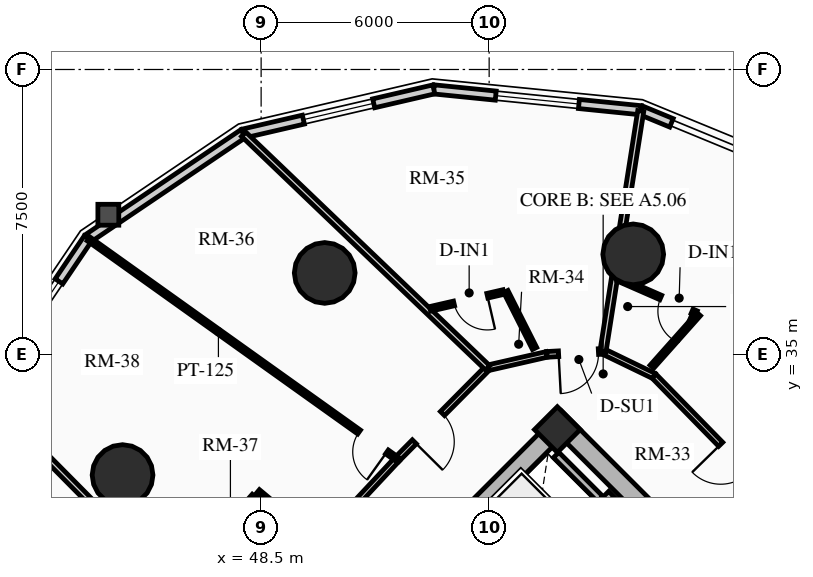
"""IFC4 building model, lengths in metres.
Left out: names, types, materials, properties, quantities, classifications, styles, units other than length and angle.
Written with IfcOpenShell. Run it as: python <this file> out.ifc"""

import sys

from ifc_helpers import new_model, si_unit, direction, frame, frame_2d, origin, origin_2d, place, context, subcontext, project, spatial, rectangle, circle, extrude, source, transform, mapped, element, fill, save


model = new_model("IFC4")
c1 = context("Model", 3, precision=1e-05, world=origin(), true_north=direction((0.0, 1.0)))
c2 = subcontext(c1, "Body", "Model", "MODEL_VIEW")
j1 = project(units=[si_unit("LENGTHUNIT", "METRE"), si_unit("PLANEANGLEUNIT", "RADIAN")], contexts=[c1])
p1 = place(None, origin())
s1 = spatial("IfcSite", under=j1, at=p1, CompositionType="ELEMENT")
p2 = place(p1, origin())
s2 = spatial("IfcBuilding", under=s1, at=p2, CompositionType="ELEMENT")
p3 = place(p2, frame((0.0, 0.0, 54.01)))
s3 = spatial("IfcBuildingStorey", under=s2, at=p3, CompositionType="ELEMENT", Elevation=54.01)
p4 = place(p3, frame((66.339, 23.227, 0.0), z_axis=(0.0, 0.0, 1.0), x_axis=(-0.707106781187, 0.707106781187, 0.0)))
e1 = element("IfcWall", 1, at=p4, inside=s3, PredefinedType="SHEAR", context=c2, shape_type="SweptSolid", body=[
    extrude(rectangle(XDim=14.3, YDim=0.5, at=frame_2d((7.15, 0.0))), origin(), (0.0, 0.0, 1.0), 2.91),
])
p5 = place(p3, frame((48.838, 25.596, 0.0), z_axis=(0.0, 0.0, 1.0), x_axis=(0.707106781187, 0.707106781187, 0.0)))
e2 = element("IfcWall", 2, at=p5, inside=s3, PredefinedType="SHEAR", context=c2, shape_type="SweptSolid", body=[
    extrude(rectangle(XDim=10.7, YDim=0.5, at=frame_2d((5.35, 0.0))), origin(), (0.0, 0.0, 1.0), 2.91),
])
m1 = source(origin(), c2, "Body", "SweptSolid", [
    extrude(rectangle(XDim=1.5, YDim=2.02, at=frame_2d((0.75, 1.01))), frame((0.0, 0.26, 0.0), z_axis=(0.0, -1.0, 0.0), x_axis=(1.0, 0.0, 0.0)), (0.0, 0.0, 1.0), 0.52),
])
p6 = place(p5, frame((4.6, 0.0, 0.0)))
e3 = element("IfcOpeningElement", 3, at=p6, cuts=e2, PredefinedType="OPENING", context=c2, shape_type="MappedRepresentation", body=[
    mapped(m1, transform((0.0, 0.0, 0.0), x_axis=(1.0, 0.0, 0.0), y_axis=(0.0, 1.0, 0.0), z_axis=(0.0, 0.0, 1.0), scale=1.0)),
])
p7 = place(p3, frame((56.294, 33.024, 0.0), z_axis=(0.0, 0.0, 1.0), x_axis=(0.707106781187, 0.707106781187, 0.0)))
e4 = element("IfcColumn", 4, at=p7, inside=s3, PredefinedType="COLUMN", context=c2, shape_type="SweptSolid", body=[
    extrude(rectangle(XDim=0.85, YDim=0.85, at=origin_2d()), origin(), (0.0, 0.0, 1.0), 2.91),
])
for number, where, z_axis, x_axis in (
    (5, (58.291, 37.635, 0.0), (0.0, 0.0, 1.0), (1.0, 0.0, 0.0)),
    (6, (50.173, 37.146, 0.0), (0.0, 0.0, 1.0), (1.0, 0.0, 0.0)),
    (7, (44.854, 31.827, 0.0), (0.0, 0.0, 1.0), (1.0, 0.0, 0.0)),
):
    element("IfcColumn", number, at=place(p3, frame(where, z_axis=z_axis, x_axis=x_axis)), inside=s3, PredefinedType="USERDEFINED", context=c2, shape_type="SweptSolid", body=[
        extrude(circle(Radius=0.8, at=origin_2d()), origin(), (0.0, 0.0, 1.0), 2.91),
    ])
p8 = place(p3, frame((58.493, 41.428, 0.0), z_axis=(0.0, 0.0, 1.0), x_axis=(0.924556017656, -0.381046152345, 0.0)))
e8 = element("IfcWall", 8, at=p8, inside=s3, PredefinedType="SOLIDWALL", context=c2, shape_type="SweptSolid", body=[
    extrude(rectangle(XDim=0.87, YDim=0.24, at=frame_2d((0.435, 0.0))), origin(), (0.0, 0.0, 1.0), 2.073),
])
p9 = place(p3, frame((53.043, 41.976, 0.0), z_axis=(0.0, 0.0, 1.0), x_axis=(0.994970765694, -0.100165739718, 0.0)))
e9 = element("IfcWall", 9, at=p9, inside=s3, PredefinedType="SOLIDWALL", context=c2, shape_type="SweptSolid", body=[
    extrude(rectangle(XDim=5.477, YDim=0.24, at=frame_2d((2.738, 0.0))), origin(), (0.0, 0.0, 1.0), 2.073),
])
m2 = source(origin(), c2, "Body", "SweptSolid", [
    extrude(rectangle(XDim=2.2, YDim=1.35, at=frame_2d((1.1, 0.675))), frame((0.0, 0.13, 0.0), z_axis=(0.0, -1.0, 0.0), x_axis=(1.0, 0.0, 0.0)), (0.0, 0.0, 1.0), 0.26),
])
p10 = place(p9, frame((1.638, 0.0, 0.65)))
e10 = element("IfcOpeningElement", 10, at=p10, cuts=e9, PredefinedType="OPENING", context=c2, shape_type="MappedRepresentation", body=[
    mapped(m2, transform((0.0, 0.0, 0.0), x_axis=(1.0, 0.0, 0.0), y_axis=(0.0, 1.0, 0.0), z_axis=(0.0, 0.0, 1.0), scale=1.0)),
])
p11 = place(p3, frame((48.031, 40.814, 0.0), z_axis=(0.0, 0.0, 1.0), x_axis=(0.974166016949, 0.225833060959, 0.0)))
e11 = element("IfcWall", 11, at=p11, inside=s3, PredefinedType="SOLIDWALL", context=c2, shape_type="SweptSolid", body=[
    extrude(rectangle(XDim=5.146, YDim=0.24, at=frame_2d((2.573, 0.0))), origin(), (0.0, 0.0, 1.0), 2.073),
])
m3 = source(origin(), c2, "Body", "SweptSolid", [
    extrude(rectangle(XDim=1.9, YDim=1.35, at=frame_2d((0.95, 0.675))), frame((0.0, 0.13, 0.0), z_axis=(0.0, -1.0, 0.0), x_axis=(1.0, 0.0, 0.0)), (0.0, 0.0, 1.0), 0.26),
])
p12 = place(p11, frame((1.623, 0.0, 0.65)))
e12 = element("IfcOpeningElement", 12, at=p12, cuts=e11, PredefinedType="OPENING", context=c2, shape_type="MappedRepresentation", body=[
    mapped(m3, transform((0.0, 0.0, 0.0), x_axis=(1.0, 0.0, 0.0), y_axis=(0.0, 1.0, 0.0), z_axis=(0.0, 0.0, 1.0), scale=1.0)),
])
p13 = place(p3, frame((43.945, 38.055, 0.0), z_axis=(0.0, 0.0, 1.0), x_axis=(0.828736708604, 0.559638693991, 0.0)))
e13 = element("IfcWall", 13, at=p13, inside=s3, PredefinedType="SOLIDWALL", context=c2, shape_type="SweptSolid", body=[
    extrude(rectangle(XDim=4.93, YDim=0.24, at=frame_2d((2.465, 0.0))), origin(), (0.0, 0.0, 1.0), 2.073),
])
p14 = place(p3, frame((41.186, 33.969, 0.0), z_axis=(0.0, 0.0, 1.0), x_axis=(0.559638693991, 0.828736708604, 0.0)))
e14 = element("IfcWall", 14, at=p14, inside=s3, PredefinedType="SOLIDWALL", context=c2, shape_type="SweptSolid", body=[
    extrude(rectangle(XDim=4.93, YDim=0.24, at=frame_2d((2.465, 0.0))), origin(), (0.0, 0.0, 1.0), 2.073),
])
p15 = place(p14, frame((1.365, 0.0, 0.65)))
e15 = element("IfcOpeningElement", 15, at=p15, cuts=e14, PredefinedType="OPENING", context=c2, shape_type="MappedRepresentation", body=[
    mapped(m2, transform((0.0, 0.0, 0.0), x_axis=(1.0, 0.0, 0.0), y_axis=(0.0, 1.0, 0.0), z_axis=(0.0, 0.0, 1.0), scale=1.0)),
])
p16 = place(p3, frame((55.615, 29.227, 0.0), z_axis=(0.0, 0.0, 1.0), x_axis=(0.707147878904, 0.70706568108, 0.0)))
e16 = element("IfcWall", 16, at=p16, inside=s3, PredefinedType="SHEAR", context=c2, shape_type="SweptSolid", body=[
    extrude(rectangle(XDim=2.97, YDim=0.2, at=frame_2d((1.485, 0.0))), origin(), (0.0, 0.0, 1.0), 2.91),
])
p17 = place(p3, frame((57.419, 31.2, 0.0), z_axis=(0.0, 0.0, 1.0), x_axis=(-0.707032117043, 0.707181437447, 0.0)))
e17 = element("IfcWall", 17, at=p17, inside=s3, PredefinedType="SHEAR", context=c2, shape_type="SweptSolid", body=[
    extrude(rectangle(XDim=1.635, YDim=0.2, at=frame_2d((0.817, 0.0))), origin(), (0.0, 0.0, 1.0), 2.91),
])
p18 = place(p3, frame((63.086, 30.086, 0.0), z_axis=(0.0, 0.0, 1.0), x_axis=(-0.699032802832, 0.715089603172, 0.0)))
e18 = element("IfcWall", 18, at=p18, inside=s3, PredefinedType="PARTITIONING", context=c2, shape_type="SweptSolid", body=[
    extrude(rectangle(XDim=6.082, YDim=0.15, at=frame_2d((3.041, 0.0))), origin(), (0.0, 0.0, 1.0), 2.159),
])
m4 = source(origin(), c2, "Body", "SweptSolid", [
    extrude(rectangle(XDim=1.05, YDim=2.015, at=frame_2d((0.525, 1.007))), frame((0.0, 0.085, 0.0), z_axis=(0.0, -1.0, 0.0), x_axis=(1.0, 0.0, 0.0)), (0.0, 0.0, 1.0), 0.17),
])
p19 = place(p18, frame((2.516, 0.0, 0.0)))
e19 = element("IfcOpeningElement", 19, at=p19, cuts=e18, PredefinedType="OPENING", context=c2, shape_type="MappedRepresentation", body=[
    mapped(m4, transform((0.0, 0.0, 0.0), x_axis=(1.0, 0.0, 0.0), y_axis=(0.0, 1.0, 0.0), z_axis=(0.0, 0.0, 1.0), scale=1.0)),
])
p20 = place(p3, frame((58.835, 34.435, 0.0), z_axis=(0.0, 0.0, 1.0), x_axis=(-0.900352167336, 0.4351620098, 0.0)))
e20 = element("IfcWall", 20, at=p20, inside=s3, PredefinedType="PARTITIONING", context=c2, shape_type="SweptSolid", body=[
    extrude(rectangle(XDim=1.488, YDim=0.15, at=frame_2d((0.744, 0.0))), origin(), (0.0, 0.0, 1.0), 2.205),
])
p21 = place(p3, frame((57.495, 35.083, 0.0), z_axis=(0.0, 0.0, 1.0), x_axis=(-0.998536503254, -0.054081897798, 0.0)))
e21 = element("IfcWall", 21, at=p21, inside=s3, PredefinedType="PARTITIONING", context=c2, shape_type="SweptSolid", body=[
    extrude(rectangle(XDim=1.481, YDim=0.15, at=frame_2d((0.74, 0.0))), origin(), (0.0, 0.0, 1.0), 2.159),
])
p22 = place(p21, frame((0.12, 0.0, 0.0)))
e22 = element("IfcOpeningElement", 22, at=p22, cuts=e21, PredefinedType="OPENING", context=c2, shape_type="MappedRepresentation", body=[
    mapped(m4, transform((0.0, 0.0, 0.0), x_axis=(1.0, 0.0, 0.0), y_axis=(0.0, 1.0, 0.0), z_axis=(0.0, 0.0, 1.0), scale=1.0)),
])
p23 = place(p3, frame((56.017, 35.003, 0.0), z_axis=(0.0, 0.0, 1.0), x_axis=(-0.974924954781, -0.222533890777, 0.0)))
e23 = element("IfcWall", 23, at=p23, inside=s3, PredefinedType="PARTITIONING", context=c2, shape_type="SweptSolid", body=[
    extrude(rectangle(XDim=1.595, YDim=0.15, at=frame_2d((0.798, 0.0))), origin(), (0.0, 0.0, 1.0), 2.205),
])
p24 = place(p3, frame((54.461, 34.648, 0.0), z_axis=(0.0, 0.0, 1.0), x_axis=(-0.70403409755, -0.710166170334, 0.0)))
e24 = element("IfcWall", 24, at=p24, inside=s3, PredefinedType="PARTITIONING", context=c2, shape_type="SweptSolid", body=[
    extrude(rectangle(XDim=3.384, YDim=0.15, at=frame_2d((1.692, 0.0))), origin(), (0.0, 0.0, 1.0), 2.159),
])
p25 = place(p24, frame((1.691, 0.0, 0.0)))
e25 = element("IfcOpeningElement", 25, at=p25, cuts=e24, PredefinedType="OPENING", context=c2, shape_type="MappedRepresentation", body=[
    mapped(m4, transform((0.0, 0.0, 0.0), x_axis=(1.0, 0.0, 0.0), y_axis=(0.0, 1.0, 0.0), z_axis=(0.0, 0.0, 1.0), scale=1.0)),
])
p26 = place(p3, frame((52.079, 32.244, 0.0), z_axis=(0.0, 0.0, 1.0), x_axis=(-0.682703325574, -0.730695674854, 0.0)))
e26 = element("IfcWall", 26, at=p26, inside=s3, PredefinedType="PARTITIONING", context=c2, shape_type="SweptSolid", body=[
    extrude(rectangle(XDim=6.527, YDim=0.15, at=frame_2d((3.263, 0.0))), origin(), (0.0, 0.0, 1.0), 2.159),
])
p27 = place(p3, frame((57.495, 35.083, 0.0), z_axis=(0.0, 0.0, 1.0), x_axis=(0.155296837382, 0.987867851638, 0.0)))
e27 = element("IfcWall", 27, at=p27, inside=s3, PredefinedType="PARTITIONING", context=c2, shape_type="SweptSolid", body=[
    extrude(rectangle(XDim=6.403, YDim=0.16, at=frame_2d((3.202, 0.0))), origin(), (0.0, 0.0, 1.0), 2.073),
])
p28 = place(p3, frame((54.461, 34.648, 0.0), z_axis=(0.0, 0.0, 1.0), x_axis=(-0.722290498621, 0.691589788532, 0.0)))
e28 = element("IfcWall", 28, at=p28, inside=s3, PredefinedType="PARTITIONING", context=c2, shape_type="SweptSolid", body=[
    extrude(rectangle(XDim=8.891, YDim=0.16, at=frame_2d((4.445, 0.0))), origin(), (0.0, 0.0, 1.0), 2.073),
])
p29 = place(p3, frame((47.623, 27.475, 0.0), z_axis=(0.0, 0.0, 1.0), x_axis=(-0.703512438021, 0.71068294587, 0.0)))
e29 = element("IfcWall", 29, at=p29, inside=s3, PredefinedType="PARTITIONING", context=c2, shape_type="SweptSolid", body=[
    extrude(rectangle(XDim=9.125, YDim=0.16, at=frame_2d((4.562, 0.0))), origin(), (0.0, 0.0, 1.0), 2.073),
])
p30 = place(p3, frame((55.695, 35.158, 0.0), z_axis=(0.0, 0.0, 1.0), x_axis=(-0.450698346964, 0.892676313142, 0.0)))
e30 = element("IfcWall", 30, at=p30, inside=s3, PredefinedType="PARTITIONING", context=c2, shape_type="SweptSolid", body=[
    extrude(rectangle(XDim=1.68, YDim=0.125, at=frame_2d((0.84, 0.0))), origin(), (0.0, 0.0, 1.0), 2.205),
])
p31 = place(p3, frame((54.878, 36.644, 0.0), z_axis=(0.0, 0.0, 1.0), x_axis=(-0.974554917581, -0.224148862631, 0.0)))
e31 = element("IfcWall", 31, at=p31, inside=s3, PredefinedType="PARTITIONING", context=c2, shape_type="SweptSolid", body=[
    extrude(rectangle(XDim=1.982, YDim=0.125, at=frame_2d((0.991, 0.0))), origin(), (0.0, 0.0, 1.0), 2.635),
])
m5 = source(origin(), c2, "Body", "SweptSolid", [
    extrude(rectangle(XDim=0.9, YDim=2.005, at=frame_2d((0.45, 1.002))), frame((0.0, 0.073, 0.0), z_axis=(0.0, -1.0, 0.0), x_axis=(1.0, 0.0, 0.0)), (0.0, 0.0, 1.0), 0.145),
])
p32 = place(p31, frame((0.436, 0.0, 0.0)))
e32 = element("IfcOpeningElement", 32, at=p32, cuts=e31, PredefinedType="OPENING", context=c2, shape_type="MappedRepresentation", body=[
    mapped(m5, transform((0.0, 0.0, 0.0), x_axis=(1.0, 0.0, 0.0), y_axis=(0.0, 1.0, 0.0), z_axis=(0.0, 0.0, 1.0), scale=1.0)),
])
p33 = place(p3, frame((52.079, 32.244, 0.0), z_axis=(0.0, 0.0, 1.0), x_axis=(-0.813888867537, 0.581020577346, 0.0)))
e33 = element("IfcWall", 33, at=p33, inside=s3, PredefinedType="PARTITIONING", context=c2, shape_type="SweptSolid", body=[
    extrude(rectangle(XDim=9.977, YDim=0.125, at=frame_2d((4.988, 0.0))), origin(), (0.0, 0.0, 1.0), 2.073),
])
p34 = place(p33, frame((0.33, 0.0, 0.0)))
e34 = element("IfcOpeningElement", 34, at=p34, cuts=e33, PredefinedType="OPENING", context=c2, shape_type="MappedRepresentation", body=[
    mapped(m5, transform((0.0, 0.0, 0.0), x_axis=(1.0, 0.0, 0.0), y_axis=(0.0, 1.0, 0.0), z_axis=(0.0, 0.0, 1.0), scale=1.0)),
])
p35 = place(p3, frame((49.809, 30.234, 0.0), z_axis=(0.0, 0.0, 1.0), x_axis=(-0.76830950514, 0.640078514177, 0.0)))
e35 = element("IfcWall", 35, at=p35, inside=s3, PredefinedType="PARTITIONING", context=c2, shape_type="SweptSolid", body=[
    extrude(rectangle(XDim=1.814, YDim=0.125, at=frame_2d((0.907, 0.0))), origin(), (0.0, 0.0, 1.0), 2.635),
])
p36 = place(p3, frame((48.313, 31.28, 0.0), z_axis=(0.0, 0.0, 1.0), x_axis=(-0.662230126621, -0.749300513409, 0.0)))
e36 = element("IfcWall", 36, at=p36, inside=s3, PredefinedType="PARTITIONING", context=c2, shape_type="SweptSolid", body=[
    extrude(rectangle(XDim=2.958, YDim=0.125, at=frame_2d((1.479, 0.0))), origin(), (0.0, 0.0, 1.0), 2.159),
])
p37 = place(p36, frame((0.12, 0.0, 0.0)))
e37 = element("IfcOpeningElement", 37, at=p37, cuts=e36, PredefinedType="OPENING", context=c2, shape_type="MappedRepresentation", body=[
    mapped(m5, transform((0.0, 0.0, 0.0), x_axis=(1.0, 0.0, 0.0), y_axis=(0.0, 1.0, 0.0), z_axis=(0.0, 0.0, 1.0), scale=1.0)),
])
p38 = place(p3, frame((58.78, 34.676, 0.0), z_axis=(0.0, 0.0, 1.0), x_axis=(0.6649433297, 0.746893813261, 0.0)))
e38 = element("IfcWall", 38, at=p38, inside=s3, PredefinedType="PARTITIONING", context=c2, shape_type="SweptSolid", body=[
    extrude(rectangle(XDim=1.856, YDim=0.125, at=frame_2d((0.928, 0.0))), origin(), (0.0, 0.0, 1.0), 2.205),
])
p39 = place(p3, frame((59.95, 36.09, 0.0), z_axis=(0.0, 0.0, 1.0), x_axis=(-0.916037613906, 0.401092370795, 0.0)))
e39 = element("IfcWall", 39, at=p39, inside=s3, PredefinedType="PARTITIONING", context=c2, shape_type="SweptSolid", body=[
    extrude(rectangle(XDim=2.247, YDim=0.125, at=frame_2d((1.124, 0.0))), origin(), (0.0, 0.0, 1.0), 2.159),
])
p40 = place(p39, frame((0.12, 0.0, 0.0)))
e40 = element("IfcOpeningElement", 40, at=p40, cuts=e39, PredefinedType="OPENING", context=c2, shape_type="MappedRepresentation", body=[
    mapped(m5, transform((0.0, 0.0, 0.0), x_axis=(1.0, 0.0, 0.0), y_axis=(0.0, 1.0, 0.0), z_axis=(0.0, 0.0, 1.0), scale=1.0)),
])
m6 = source(origin(), c2, "Body", "SweptSolid", [
    extrude(rectangle(XDim=2.2, YDim=1.35, at=frame_2d((1.1, 0.675))), frame((0.0, 0.03, 0.0), z_axis=(0.0, -1.0, 0.0), x_axis=(1.0, 0.0, 0.0)), (0.0, 0.0, 1.0), 0.06),
])
p41 = place(p10, origin())
e41 = element("IfcWindow", 41, at=p41, inside=s3, PartitioningType="DOUBLE_PANEL_VERTICAL", PredefinedType="WINDOW", context=c2, shape_type="MappedRepresentation", body=[
    mapped(m6, transform((0.0, 0.0, 0.0), x_axis=(1.0, 0.0, 0.0), y_axis=(0.0, 1.0, 0.0), z_axis=(0.0, 0.0, 1.0), scale=1.0)),
])
fill(e10, e41)
m7 = source(origin(), c2, "Body", "SweptSolid", [
    extrude(rectangle(XDim=1.9, YDim=1.35, at=frame_2d((0.95, 0.675))), frame((0.0, 0.03, 0.0), z_axis=(0.0, -1.0, 0.0), x_axis=(1.0, 0.0, 0.0)), (0.0, 0.0, 1.0), 0.06),
])
p42 = place(p12, origin())
e42 = element("IfcWindow", 42, at=p42, inside=s3, PartitioningType="DOUBLE_PANEL_VERTICAL", PredefinedType="WINDOW", context=c2, shape_type="MappedRepresentation", body=[
    mapped(m7, transform((0.0, 0.0, 0.0), x_axis=(1.0, 0.0, 0.0), y_axis=(0.0, 1.0, 0.0), z_axis=(0.0, 0.0, 1.0), scale=1.0)),
])
fill(e12, e42)
p43 = place(p15, origin())
e43 = element("IfcWindow", 43, at=p43, inside=s3, PartitioningType="DOUBLE_PANEL_VERTICAL", PredefinedType="WINDOW", context=c2, shape_type="MappedRepresentation", body=[
    mapped(m6, transform((0.0, 0.0, 0.0), x_axis=(1.0, 0.0, 0.0), y_axis=(0.0, 1.0, 0.0), z_axis=(0.0, 0.0, 1.0), scale=1.0)),
])
fill(e15, e43)
m8 = source(origin(), c2, "Body", "SweptSolid", [
    extrude(rectangle(XDim=1.05, YDim=2.015, at=frame_2d((0.525, 1.007))), frame((0.0, 0.025, 0.0), z_axis=(0.0, -1.0, 0.0), x_axis=(1.0, 0.0, 0.0)), (0.0, 0.0, 1.0), 0.05),
])
p44 = place(p22, origin())
e44 = element("IfcDoor", 44, at=p44, inside=s3, OperationType="SINGLE_SWING_RIGHT", PredefinedType="DOOR", context=c2, shape_type="MappedRepresentation", body=[
    mapped(m8, transform((0.0, 0.0, 0.0), x_axis=(1.0, 0.0, 0.0), y_axis=(0.0, 1.0, 0.0), z_axis=(0.0, 0.0, 1.0), scale=1.0)),
])
fill(e22, e44)
m9 = source(origin(), c2, "Body", "SweptSolid", [
    extrude(rectangle(XDim=0.9, YDim=2.005, at=frame_2d((0.45, 1.002))), frame((0.0, 0.025, 0.0), z_axis=(0.0, -1.0, 0.0), x_axis=(1.0, 0.0, 0.0)), (0.0, 0.0, 1.0), 0.05),
])
p45 = place(p32, origin())
e45 = element("IfcDoor", 45, at=p45, inside=s3, OperationType="SINGLE_SWING_LEFT", PredefinedType="DOOR", context=c2, shape_type="MappedRepresentation", body=[
    mapped(m9, transform((0.0, 0.0, 0.0), x_axis=(1.0, 0.0, 0.0), y_axis=(0.0, 1.0, 0.0), z_axis=(0.0, 0.0, 1.0), scale=1.0)),
])
fill(e32, e45)
p46 = place(p25, origin())
e46 = element("IfcDoor", 46, at=p46, inside=s3, OperationType="SINGLE_SWING_RIGHT", PredefinedType="DOOR", context=c2, shape_type="MappedRepresentation", body=[
    mapped(m8, transform((0.0, 0.0, 0.0), x_axis=(1.0, 0.0, 0.0), y_axis=(0.0, 1.0, 0.0), z_axis=(0.0, 0.0, 1.0), scale=1.0)),
])
fill(e25, e46)
p47 = place(p34, origin())
e47 = element("IfcDoor", 47, at=p47, inside=s3, OperationType="SINGLE_SWING_LEFT", PredefinedType="DOOR", context=c2, shape_type="MappedRepresentation", body=[
    mapped(m9, transform((0.0, 0.0, 0.0), x_axis=(1.0, 0.0, 0.0), y_axis=(0.0, 1.0, 0.0), z_axis=(0.0, 0.0, 1.0), scale=1.0)),
])
fill(e34, e47)
p48 = place(p19, origin())
e48 = element("IfcDoor", 48, at=p48, inside=s3, OperationType="SINGLE_SWING_RIGHT", PredefinedType="DOOR", context=c2, shape_type="MappedRepresentation", body=[
    mapped(m8, transform((0.0, 0.0, 0.0), x_axis=(1.0, 0.0, 0.0), y_axis=(0.0, 1.0, 0.0), z_axis=(0.0, 0.0, 1.0), scale=1.0)),
])
fill(e19, e48)
p49 = place(p40, origin())
e49 = element("IfcDoor", 49, at=p49, inside=s3, OperationType="SINGLE_SWING_LEFT", PredefinedType="DOOR", context=c2, shape_type="MappedRepresentation", body=[
    mapped(m9, transform((0.0, 0.0, 0.0), x_axis=(1.0, 0.0, 0.0), y_axis=(0.0, 1.0, 0.0), z_axis=(0.0, 0.0, 1.0), scale=1.0)),
])
fill(e40, e49)
save(model, sys.argv[1])
